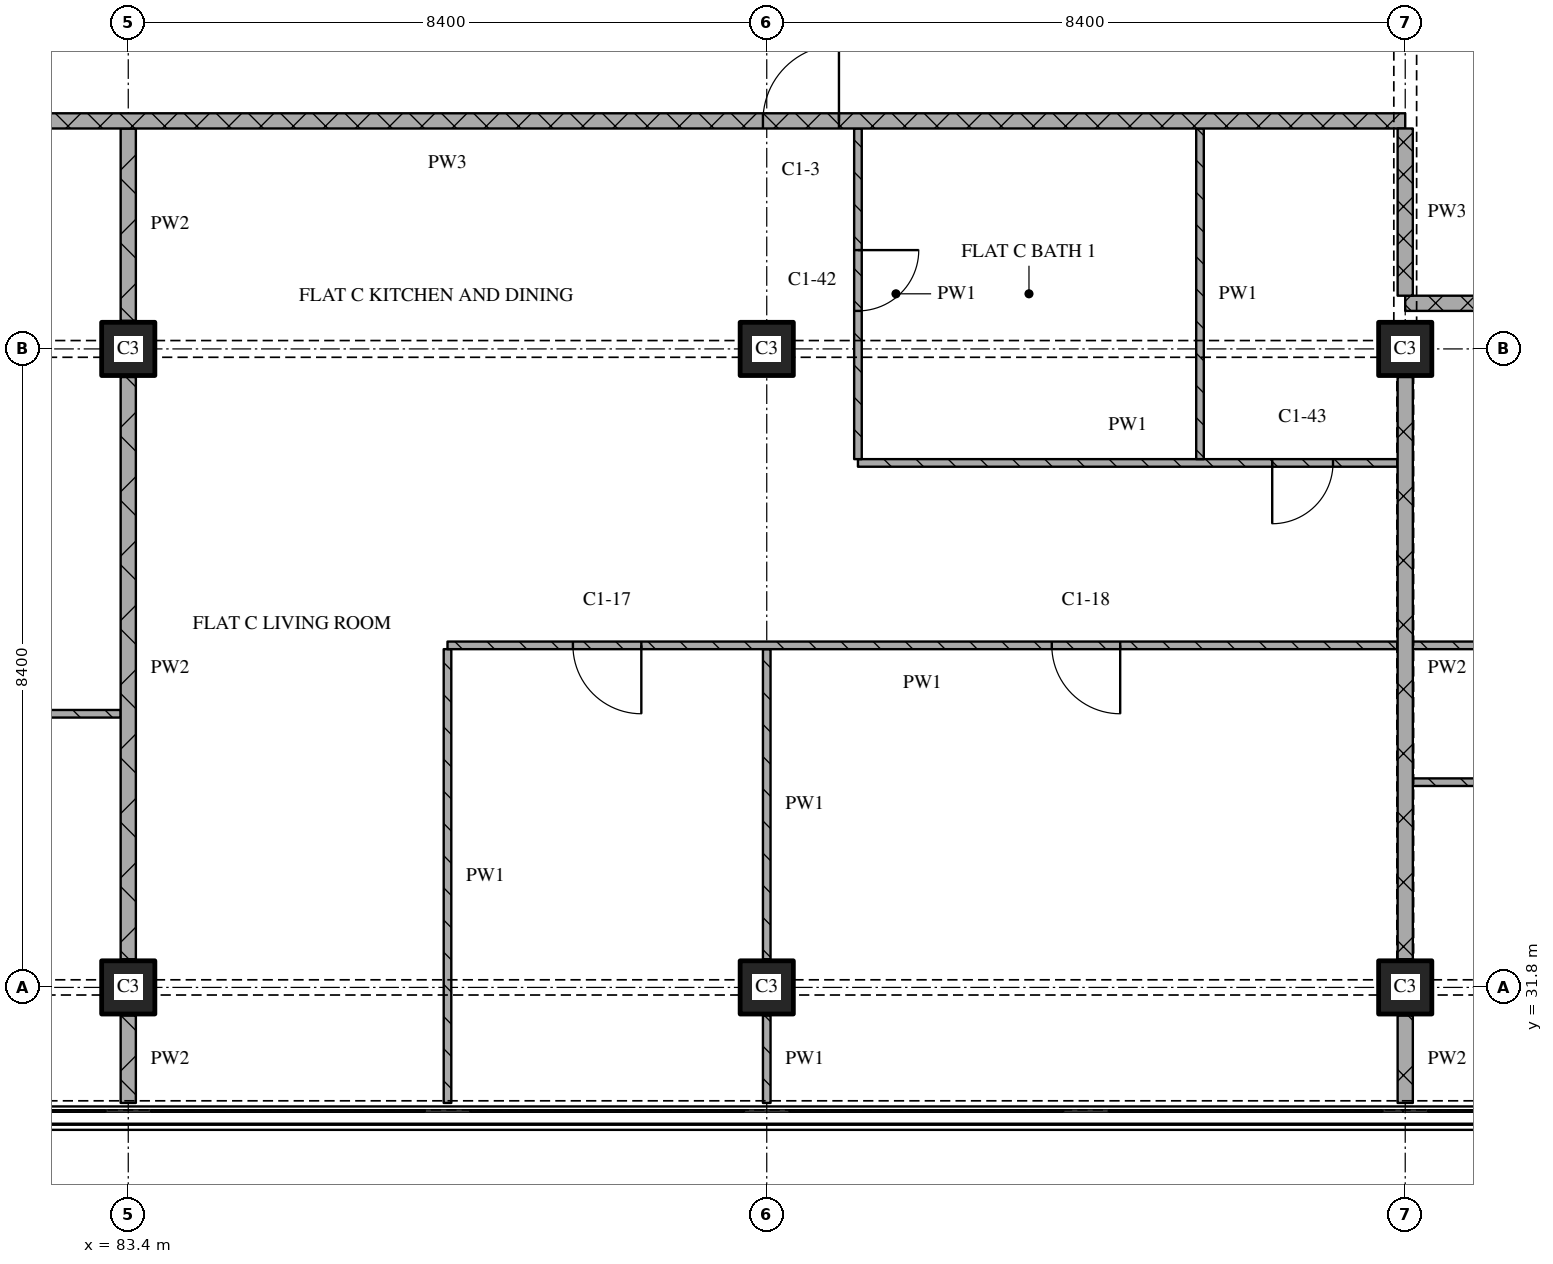
"""IFC4 building model, lengths in metres.
Left out: names, types, materials, properties, quantities, classifications, styles, units other than length and angle.
Written with IfcOpenShell. Run it as: python <this file> out.ifc"""

import sys

from ifc_helpers import new_model, si_unit, direction, frame, frame_2d, origin, origin_2d, place, context, subcontext, project, spatial, rectangle, extrude, element, fill, save


model = new_model("IFC4")
c1 = context("Model", 3, precision=1e-05, world=origin(), true_north=direction((0.0, 1.0)))
c2 = subcontext(c1, "Body", "Model", "MODEL_VIEW")
j1 = project(units=[si_unit("LENGTHUNIT", "METRE"), si_unit("PLANEANGLEUNIT", "RADIAN")], contexts=[c1])
p1 = place(None, origin())
s1 = spatial("IfcSite", under=j1, at=p1, CompositionType="ELEMENT")
p2 = place(p1, origin())
s2 = spatial("IfcBuilding", under=s1, at=p2, CompositionType="ELEMENT")
p3 = place(p2, frame((0.0, 0.0, 154.65)))
s3 = spatial("IfcBuildingStorey", under=s2, at=p3, CompositionType="ELEMENT", Elevation=154.65)
for number, where, z_axis, x_axis in (
    (1, (83.4, 31.8, 0.0), (0.0, 0.0, 1.0), (1.0, 0.0, 0.0)),
    (2, (83.4, 40.2, 0.0), (0.0, 0.0, 1.0), (1.0, 0.0, 0.0)),
    (3, (91.8, 31.8, 0.0), (0.0, 0.0, 1.0), (1.0, 0.0, 0.0)),
    (4, (91.8, 40.2, 0.0), (0.0, 0.0, 1.0), (1.0, 0.0, 0.0)),
    (5, (100.2, 31.8, 0.0), (0.0, 0.0, 1.0), (1.0, 0.0, 0.0)),
    (6, (100.2, 40.2, 0.0), (0.0, 0.0, 1.0), (1.0, 0.0, 0.0)),
):
    element("IfcColumn", number, at=place(p3, frame(where, z_axis=z_axis, x_axis=x_axis)), inside=s3, PredefinedType="COLUMN", context=c2, shape_type="SweptSolid", body=[
        extrude(rectangle(XDim=0.7, YDim=0.7, at=origin_2d()), origin(), (0.0, 0.0, 1.0), 3.6),
    ])
p4 = place(p3, frame((117.0, 34.5, 0.0), z_axis=(0.0, 0.0, 1.0), x_axis=(-1.0, 0.0, 0.0)))
e7 = element("IfcWall", 7, at=p4, inside=s3, PredefinedType="PARTITIONING", context=c2, shape_type="SweptSolid", body=[
    extrude(rectangle(XDim=16.7, YDim=0.1, at=frame_2d((8.35, 0.0))), origin(), (0.0, 0.0, 1.0), 3.32),
])
p5 = place(p4, frame((7.95, 0.0, 0.0)))
e8 = element("IfcOpeningElement", 8, at=p5, cuts=e7, PredefinedType="OPENING", context=c2, shape_type="SweptSolid", body=[
    extrude(rectangle(XDim=0.9, YDim=2.1, at=frame_2d((0.45, 1.05))), frame((0.0, 0.06, 0.0), z_axis=(0.0, -1.0, 0.0), x_axis=(1.0, 0.0, 0.0)), (0.0, 0.0, 1.0), 0.12),
])
p6 = place(p4, frame((14.25, 0.0, 0.0)))
e9 = element("IfcOpeningElement", 9, at=p6, cuts=e7, PredefinedType="OPENING", context=c2, shape_type="SweptSolid", body=[
    extrude(rectangle(XDim=0.9, YDim=2.1, at=frame_2d((0.45, 1.05))), frame((0.0, 0.06, 0.0), z_axis=(0.0, -1.0, 0.0), x_axis=(1.0, 0.0, 0.0)), (0.0, 0.0, 1.0), 0.12),
])
p7 = place(p3, frame((83.3, 35.4, 0.0), z_axis=(0.0, 0.0, 1.0), x_axis=(-1.0, 0.0, 0.0)))
e10 = element("IfcWall", 10, at=p7, inside=s3, PredefinedType="PARTITIONING", context=c2, shape_type="SweptSolid", body=[
    extrude(rectangle(XDim=4.1, YDim=0.1, at=frame_2d((2.05, 0.0))), origin(), (0.0, 0.0, 1.0), 3.32),
])
p8 = place(p7, frame((1.55, 0.0, 0.0)))
e11 = element("IfcOpeningElement", 11, at=p8, cuts=e10, PredefinedType="OPENING", context=c2, shape_type="SweptSolid", body=[
    extrude(rectangle(XDim=0.9, YDim=2.1, at=frame_2d((0.45, 1.05))), frame((0.0, 0.06, 0.0), z_axis=(0.0, -1.0, 0.0), x_axis=(1.0, 0.0, 0.0)), (0.0, 0.0, 1.0), 0.12),
])
p9 = place(p3, frame((93.0, 38.7, 0.0), z_axis=(0.0, 0.0, 1.0), x_axis=(1.0, 0.0, 0.0)))
e12 = element("IfcWall", 12, at=p9, inside=s3, PredefinedType="PARTITIONING", context=c2, shape_type="SweptSolid", body=[
    extrude(rectangle(XDim=7.1, YDim=0.1, at=frame_2d((3.55, 0.0))), origin(), (0.0, 0.0, 1.0), 3.32),
])
p10 = place(p9, frame((5.45, 0.0, 0.0)))
e13 = element("IfcOpeningElement", 13, at=p10, cuts=e12, PredefinedType="OPENING", context=c2, shape_type="SweptSolid", body=[
    extrude(rectangle(XDim=0.8, YDim=2.1, at=frame_2d((0.4, 1.05))), frame((0.0, 0.06, 0.0), z_axis=(0.0, -1.0, 0.0), x_axis=(1.0, 0.0, 0.0)), (0.0, 0.0, 1.0), 0.12),
])
p11 = place(p3, frame((124.48, 40.8, 0.0), z_axis=(0.0, 0.0, 1.0), x_axis=(-1.0, 0.0, 0.0)))
e14 = element("IfcWall", 14, at=p11, inside=s3, PredefinedType="PARTITIONING", context=c2, shape_type="SweptSolid", body=[
    extrude(rectangle(XDim=24.28, YDim=0.2, at=frame_2d((12.14, 0.0))), origin(), (0.0, 0.0, 1.0), 3.32),
])
p12 = place(p11, frame((10.73, 0.0, 0.0)))
e15 = element("IfcOpeningElement", 15, at=p12, cuts=e14, PredefinedType="OPENING", context=c2, shape_type="SweptSolid", body=[
    extrude(rectangle(XDim=1.0, YDim=2.1, at=frame_2d((0.5, 1.05))), frame((0.0, 0.11, 0.0), z_axis=(0.0, -1.0, 0.0), x_axis=(1.0, 0.0, 0.0)), (0.0, 0.0, 1.0), 0.22),
])
p13 = place(p3, frame((100.2, 43.2, 0.0), z_axis=(0.0, 0.0, 1.0), x_axis=(-1.0, 0.0, 0.0)))
e16 = element("IfcWall", 16, at=p13, inside=s3, PredefinedType="PARTITIONING", context=c2, shape_type="SweptSolid", body=[
    extrude(rectangle(XDim=25.2, YDim=0.2, at=frame_2d((12.6, 0.0))), origin(), (0.0, 0.0, 1.0), 3.32),
])
p14 = place(p13, frame((7.45, 0.0, 0.0)))
e17 = element("IfcOpeningElement", 17, at=p14, cuts=e16, PredefinedType="OPENING", context=c2, shape_type="SweptSolid", body=[
    extrude(rectangle(XDim=1.0, YDim=2.1, at=frame_2d((0.5, 1.05))), frame((0.0, 0.11, 0.0), z_axis=(0.0, -1.0, 0.0), x_axis=(1.0, 0.0, 0.0)), (0.0, 0.0, 1.0), 0.22),
])
p15 = place(p13, frame((20.95, 0.0, 0.0)))
e18 = element("IfcOpeningElement", 18, at=p15, cuts=e16, PredefinedType="OPENING", context=c2, shape_type="SweptSolid", body=[
    extrude(rectangle(XDim=1.0, YDim=2.1, at=frame_2d((0.5, 1.05))), frame((0.0, 0.11, 0.0), z_axis=(0.0, -1.0, 0.0), x_axis=(1.0, 0.0, 0.0)), (0.0, 0.0, 1.0), 0.22),
])
p16 = place(p3, frame((83.4, 31.43, 0.0), z_axis=(0.0, 0.0, 1.0), x_axis=(0.0, -1.0, 0.0)))
e19 = element("IfcWall", 19, at=p16, inside=s3, PredefinedType="PARTITIONING", context=c2, shape_type="SweptSolid", body=[
    extrude(rectangle(XDim=1.15, YDim=0.2, at=frame_2d((0.575, 0.0))), origin(), (0.0, 0.0, 1.0), 3.32),
])
p17 = place(p3, frame((83.4, 39.83, 0.0), z_axis=(0.0, 0.0, 1.0), x_axis=(0.0, -1.0, 0.0)))
e20 = element("IfcWall", 20, at=p17, inside=s3, PredefinedType="PARTITIONING", context=c2, shape_type="SweptSolid", body=[
    extrude(rectangle(XDim=7.66, YDim=0.2, at=frame_2d((3.83, 0.0))), origin(), (0.0, 0.0, 1.0), 3.32),
])
p18 = place(p3, frame((83.4, 43.1, 0.0), z_axis=(0.0, 0.0, 1.0), x_axis=(0.0, -1.0, 0.0)))
e21 = element("IfcWall", 21, at=p18, inside=s3, PredefinedType="PARTITIONING", context=c2, shape_type="SweptSolid", body=[
    extrude(rectangle(XDim=2.53, YDim=0.2, at=frame_2d((1.265, 0.0))), origin(), (0.0, 0.0, 1.0), 3.32),
])
p19 = place(p3, frame((87.6, 36.25, 0.0), z_axis=(0.0, 0.0, 1.0), x_axis=(0.0, -1.0, 0.0)))
e22 = element("IfcWall", 22, at=p19, inside=s3, PredefinedType="PARTITIONING", context=c2, shape_type="SweptSolid", body=[
    extrude(rectangle(XDim=5.97, YDim=0.1, at=frame_2d((2.985, 0.0))), origin(), (0.0, 0.0, 1.0), 3.32),
])
p20 = place(p3, frame((91.8, 31.43, 0.0), z_axis=(0.0, 0.0, 1.0), x_axis=(0.0, -1.0, 0.0)))
e23 = element("IfcWall", 23, at=p20, inside=s3, PredefinedType="PARTITIONING", context=c2, shape_type="SweptSolid", body=[
    extrude(rectangle(XDim=1.15, YDim=0.1, at=frame_2d((0.575, 0.0))), origin(), (0.0, 0.0, 1.0), 3.32),
])
p21 = place(p3, frame((91.8, 36.25, 0.0), z_axis=(0.0, 0.0, 1.0), x_axis=(0.0, -1.0, 0.0)))
e24 = element("IfcWall", 24, at=p21, inside=s3, PredefinedType="PARTITIONING", context=c2, shape_type="SweptSolid", body=[
    extrude(rectangle(XDim=4.08, YDim=0.1, at=frame_2d((2.04, 0.0))), origin(), (0.0, 0.0, 1.0), 3.32),
])
p22 = place(p3, frame((93.0, 43.1, 0.0), z_axis=(0.0, 0.0, 1.0), x_axis=(0.0, -1.0, 0.0)))
e25 = element("IfcWall", 25, at=p22, inside=s3, PredefinedType="PARTITIONING", context=c2, shape_type="SweptSolid", body=[
    extrude(rectangle(XDim=4.35, YDim=0.1, at=frame_2d((2.175, 0.0))), origin(), (0.0, 0.0, 1.0), 3.32),
])
p23 = place(p22, frame((1.6, 0.0, 0.0)))
e26 = element("IfcOpeningElement", 26, at=p23, cuts=e25, PredefinedType="OPENING", context=c2, shape_type="SweptSolid", body=[
    extrude(rectangle(XDim=0.8, YDim=2.1, at=frame_2d((0.4, 1.05))), frame((0.0, 0.06, 0.0), z_axis=(0.0, -1.0, 0.0), x_axis=(1.0, 0.0, 0.0)), (0.0, 0.0, 1.0), 0.12),
])
p24 = place(p3, frame((97.5, 43.1, 0.0), z_axis=(0.0, 0.0, 1.0), x_axis=(0.0, -1.0, 0.0)))
e27 = element("IfcWall", 27, at=p24, inside=s3, PredefinedType="PARTITIONING", context=c2, shape_type="SweptSolid", body=[
    extrude(rectangle(XDim=4.35, YDim=0.1, at=frame_2d((2.175, 0.0))), origin(), (0.0, 0.0, 1.0), 3.32),
])
p25 = place(p3, frame((100.2, 43.1, 0.0), z_axis=(0.0, 0.0, 1.0), x_axis=(0.0, -1.0, 0.0)))
e28 = element("IfcWall", 28, at=p25, inside=s3, PredefinedType="PARTITIONING", context=c2, shape_type="SweptSolid", body=[
    extrude(rectangle(XDim=2.2, YDim=0.2, at=frame_2d((1.1, 0.0))), origin(), (0.0, 0.0, 1.0), 2.43),
])
p26 = place(p3, frame((100.2, 31.43, 0.0), z_axis=(0.0, 0.0, 1.0), x_axis=(0.0, -1.0, 0.0)))
e29 = element("IfcWall", 29, at=p26, inside=s3, PredefinedType="PARTITIONING", context=c2, shape_type="SweptSolid", body=[
    extrude(rectangle(XDim=1.15, YDim=0.2, at=frame_2d((0.575, 0.0))), origin(), (0.0, 0.0, 1.0), 3.32),
])
p27 = place(p3, frame((100.2, 39.83, 0.0), z_axis=(0.0, 0.0, 1.0), x_axis=(0.0, -1.0, 0.0)))
e30 = element("IfcWall", 30, at=p27, inside=s3, PredefinedType="PARTITIONING", context=c2, shape_type="SweptSolid", body=[
    extrude(rectangle(XDim=7.66, YDim=0.2, at=frame_2d((3.83, 0.0))), origin(), (0.0, 0.0, 1.0), 2.72),
])
p28 = place(p3, frame((100.1, 36.3, 0.0), z_axis=(0.0, 0.0, 1.0), x_axis=(-1.0, 0.0, 0.0)))
e31 = element("IfcWall", 31, at=p28, inside=s3, PredefinedType="PARTITIONING", context=c2, shape_type="SweptSolid", body=[
    extrude(rectangle(XDim=12.5, YDim=0.1, at=frame_2d((6.25, 0.0))), origin(), (0.0, 0.0, 1.0), 3.32),
])
p29 = place(p28, frame((3.65, 0.0, 0.0)))
e32 = element("IfcOpeningElement", 32, at=p29, cuts=e31, PredefinedType="OPENING", context=c2, shape_type="SweptSolid", body=[
    extrude(rectangle(XDim=0.9, YDim=2.1, at=frame_2d((0.45, 1.05))), frame((0.0, 0.06, 0.0), z_axis=(0.0, -1.0, 0.0), x_axis=(1.0, 0.0, 0.0)), (0.0, 0.0, 1.0), 0.12),
])
p30 = place(p28, frame((9.95, 0.0, 0.0)))
e33 = element("IfcOpeningElement", 33, at=p30, cuts=e31, PredefinedType="OPENING", context=c2, shape_type="SweptSolid", body=[
    extrude(rectangle(XDim=0.9, YDim=2.1, at=frame_2d((0.45, 1.05))), frame((0.0, 0.06, 0.0), z_axis=(0.0, -1.0, 0.0), x_axis=(1.0, 0.0, 0.0)), (0.0, 0.0, 1.0), 0.12),
])
p31 = place(p3, frame((100.3, 36.3, 0.0), z_axis=(0.0, 0.0, 1.0), x_axis=(1.0, 0.0, 0.0)))
e34 = element("IfcWall", 34, at=p31, inside=s3, PredefinedType="PARTITIONING", context=c2, shape_type="SweptSolid", body=[
    extrude(rectangle(XDim=12.2, YDim=0.1, at=frame_2d((6.1, 0.0))), origin(), (0.0, 0.0, 1.0), 3.32),
])
p32 = place(p31, frame((1.75, 0.0, 0.0)))
e35 = element("IfcOpeningElement", 35, at=p32, cuts=e34, PredefinedType="OPENING", context=c2, shape_type="SweptSolid", body=[
    extrude(rectangle(XDim=0.8, YDim=2.1, at=frame_2d((0.4, 1.05))), frame((0.0, 0.06, 0.0), z_axis=(0.0, -1.0, 0.0), x_axis=(1.0, 0.0, 0.0)), (0.0, 0.0, 1.0), 0.12),
])
p33 = place(p31, frame((6.25, 0.0, 0.0)))
e36 = element("IfcOpeningElement", 36, at=p33, cuts=e34, PredefinedType="OPENING", context=c2, shape_type="SweptSolid", body=[
    extrude(rectangle(XDim=0.8, YDim=2.1, at=frame_2d((0.4, 1.05))), frame((0.0, 0.06, 0.0), z_axis=(0.0, -1.0, 0.0), x_axis=(1.0, 0.0, 0.0)), (0.0, 0.0, 1.0), 0.12),
])
p34 = place(p10, origin())
e37 = element("IfcDoor", 37, at=p34, inside=s3, OperationType="SINGLE_SWING_RIGHT", PredefinedType="DOOR", context=c2, shape_type="SweptSolid", body=[
    extrude(rectangle(XDim=0.8, YDim=2.1, at=frame_2d((0.4, 1.05))), frame((0.0, 0.025, 0.0), z_axis=(0.0, -1.0, 0.0), x_axis=(1.0, 0.0, 0.0)), (0.0, 0.0, 1.0), 0.05),
])
fill(e13, e37)
p35 = place(p14, origin())
e38 = element("IfcDoor", 38, at=p35, inside=s3, OperationType="SINGLE_SWING_RIGHT", PredefinedType="DOOR", context=c2, shape_type="SweptSolid", body=[
    extrude(rectangle(XDim=1.0, YDim=2.1, at=frame_2d((0.5, 1.05))), frame((0.0, 0.025, 0.0), z_axis=(0.0, -1.0, 0.0), x_axis=(1.0, 0.0, 0.0)), (0.0, 0.0, 1.0), 0.05),
])
fill(e17, e38)
p36 = place(p23, origin())
e39 = element("IfcDoor", 39, at=p36, inside=s3, OperationType="SINGLE_SWING_LEFT", PredefinedType="DOOR", context=c2, shape_type="SweptSolid", body=[
    extrude(rectangle(XDim=0.8, YDim=2.1, at=frame_2d((0.4, 1.05))), frame((0.0, 0.025, 0.0), z_axis=(0.0, -1.0, 0.0), x_axis=(1.0, 0.0, 0.0)), (0.0, 0.0, 1.0), 0.05),
])
fill(e26, e39)
p37 = place(p29, origin())
e40 = element("IfcDoor", 40, at=p37, inside=s3, OperationType="SINGLE_SWING_LEFT", PredefinedType="DOOR", context=c2, shape_type="SweptSolid", body=[
    extrude(rectangle(XDim=0.9, YDim=2.1, at=frame_2d((0.45, 1.05))), frame((0.0, 0.025, 0.0), z_axis=(0.0, -1.0, 0.0), x_axis=(1.0, 0.0, 0.0)), (0.0, 0.0, 1.0), 0.05),
])
fill(e32, e40)
p38 = place(p30, origin())
e41 = element("IfcDoor", 41, at=p38, inside=s3, OperationType="SINGLE_SWING_LEFT", PredefinedType="DOOR", context=c2, shape_type="SweptSolid", body=[
    extrude(rectangle(XDim=0.9, YDim=2.1, at=frame_2d((0.45, 1.05))), frame((0.0, 0.025, 0.0), z_axis=(0.0, -1.0, 0.0), x_axis=(1.0, 0.0, 0.0)), (0.0, 0.0, 1.0), 0.05),
])
fill(e33, e41)
save(model, sys.argv[1])
